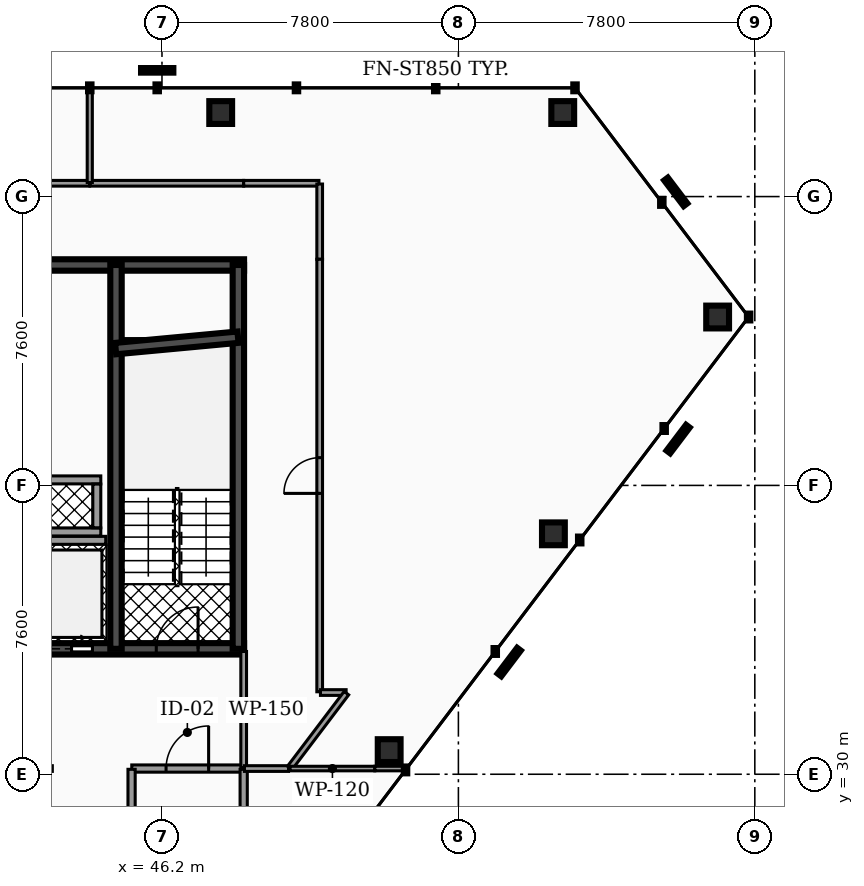
"""IFC4 building model, lengths in metres.
Left out: names, types, materials, properties, quantities, classifications, styles, units other than length and angle.
Written with IfcOpenShell. Run it as: python <this file> out.ifc"""

import sys

from ifc_helpers import new_model, si_unit, direction, frame, frame_2d, origin, origin_2d, place, context, subcontext, project, spatial, rectangle, hollow_rectangle, extrude, element, fill, save


model = new_model("IFC4")
c1 = context("Model", 3, precision=1e-05, world=origin(), true_north=direction((0.0, 1.0)))
c2 = subcontext(c1, "Body", "Model", "MODEL_VIEW")
j1 = project(units=[si_unit("LENGTHUNIT", "METRE"), si_unit("PLANEANGLEUNIT", "RADIAN")], contexts=[c1])
p1 = place(None, origin())
s1 = spatial("IfcSite", under=j1, at=p1, CompositionType="ELEMENT")
p2 = place(p1, origin())
s2 = spatial("IfcBuilding", under=s1, at=p2, CompositionType="ELEMENT")
p3 = place(p2, frame((0.0, 0.0, 246.16)))
s3 = spatial("IfcBuildingStorey", under=s2, at=p3, CompositionType="ELEMENT", Elevation=246.16)
p4 = place(p3, frame((28.5, 43.4, 0.0), z_axis=(0.0, 0.0, 1.0), x_axis=(1.0, 0.0, 0.0)))
e1 = element("IfcWall", 1, at=p4, inside=s3, PredefinedType="SHEAR", context=c2, shape_type="SweptSolid", body=[
    extrude(rectangle(XDim=19.86, YDim=0.3, at=frame_2d((9.93, 0.0))), origin(), (0.0, 0.0, 1.0), 3.18),
])
p5 = place(p3, frame((28.5, 33.3, 0.0), z_axis=(0.0, 0.0, 1.0), x_axis=(1.0, 0.0, 0.0)))
e2 = element("IfcWall", 2, at=p5, inside=s3, PredefinedType="SHEAR", context=c2, shape_type="SweptSolid", body=[
    extrude(rectangle(XDim=19.86, YDim=0.3, at=frame_2d((9.93, 0.0))), origin(), (0.0, 0.0, 1.0), 3.18),
])
p6 = place(p5, frame((3.93, 0.0, 0.0)))
e3 = element("IfcOpeningElement", 3, at=p6, cuts=e2, PredefinedType="OPENING", context=c2, shape_type="SweptSolid", body=[
    extrude(rectangle(XDim=1.1, YDim=2.15, at=frame_2d((0.55, 1.075))), frame((0.0, 0.16, 0.0), z_axis=(0.0, -1.0, 0.0), x_axis=(1.0, 0.0, 0.0)), (0.0, 0.0, 1.0), 0.32),
])
p7 = place(p5, frame((14.77, 0.0, 0.0)))
e4 = element("IfcOpeningElement", 4, at=p7, cuts=e2, PredefinedType="OPENING", context=c2, shape_type="SweptSolid", body=[
    extrude(rectangle(XDim=1.1, YDim=2.15, at=frame_2d((0.55, 1.075))), frame((0.0, 0.16, 0.0), z_axis=(0.0, -1.0, 0.0), x_axis=(1.0, 0.0, 0.0)), (0.0, 0.0, 1.0), 0.32),
])
p8 = place(p5, frame((11.25, 0.0, 0.0)))
e5 = element("IfcOpeningElement", 5, at=p8, cuts=e2, PredefinedType="OPENING", context=c2, shape_type="SweptSolid", body=[
    extrude(rectangle(XDim=1.0, YDim=2.1, at=frame_2d((0.5, 1.05))), frame((0.0, 0.16, 0.0), z_axis=(0.0, -1.0, 0.0), x_axis=(1.0, 0.0, 0.0)), (0.0, 0.0, 1.0), 0.32),
])
p9 = place(p5, frame((12.95, 0.0, 0.0)))
e6 = element("IfcOpeningElement", 6, at=p9, cuts=e2, PredefinedType="OPENING", context=c2, shape_type="SweptSolid", body=[
    extrude(rectangle(XDim=1.0, YDim=2.1, at=frame_2d((0.5, 1.05))), frame((0.0, 0.16, 0.0), z_axis=(0.0, -1.0, 0.0), x_axis=(1.0, 0.0, 0.0)), (0.0, 0.0, 1.0), 0.32),
])
p10 = place(p5, frame((5.85, 0.0, 0.0)))
e7 = element("IfcOpeningElement", 7, at=p10, cuts=e2, PredefinedType="OPENING", context=c2, shape_type="SweptSolid", body=[
    extrude(rectangle(XDim=1.0, YDim=2.1, at=frame_2d((0.5, 1.05))), frame((0.0, 0.16, 0.0), z_axis=(0.0, -1.0, 0.0), x_axis=(1.0, 0.0, 0.0)), (0.0, 0.0, 1.0), 0.32),
])
p11 = place(p5, frame((1.21, 0.0, 0.0)))
e8 = element("IfcOpeningElement", 8, at=p11, cuts=e2, PredefinedType="OPENING", context=c2, shape_type="SweptSolid", body=[
    extrude(rectangle(XDim=1.1, YDim=2.2, at=frame_2d((0.55, 1.1))), frame((0.0, 0.16, 0.0), z_axis=(0.0, -1.0, 0.0), x_axis=(1.0, 0.0, 0.0)), (0.0, 0.0, 1.0), 0.32),
])
p12 = place(p5, frame((9.34, 0.0, 0.0)))
e9 = element("IfcOpeningElement", 9, at=p12, cuts=e2, PredefinedType="OPENING", context=c2, shape_type="SweptSolid", body=[
    extrude(rectangle(XDim=1.12, YDim=2.05, at=frame_2d((0.56, 1.025))), frame((0.0, 0.16, 0.0), z_axis=(0.0, -1.0, 0.0), x_axis=(1.0, 0.0, 0.0)), (0.0, 0.0, 1.0), 0.32),
])
p13 = place(p5, frame((17.55, 0.0, 0.0)))
e10 = element("IfcOpeningElement", 10, at=p13, cuts=e2, PredefinedType="OPENING", context=c2, shape_type="SweptSolid", body=[
    extrude(rectangle(XDim=1.1, YDim=2.2, at=frame_2d((0.55, 1.1))), frame((0.0, 0.16, 0.0), z_axis=(0.0, -1.0, 0.0), x_axis=(1.0, 0.0, 0.0)), (0.0, 0.0, 1.0), 0.32),
])
for number, where, z_axis, x_axis in (
    (11, (44.99, 33.3, 0.0), (0.0, 0.0, 1.0), (0.0, 1.0, 0.0)),
    (12, (48.21, 33.3, 0.0), (0.0, 0.0, 1.0), (0.0, 1.0, 0.0)),
):
    element("IfcWall", number, at=place(p3, frame(where, z_axis=z_axis, x_axis=x_axis)), inside=s3, PredefinedType="SHEAR", context=c2, shape_type="SweptSolid", body=[
        extrude(rectangle(XDim=10.1, YDim=0.3, at=frame_2d((5.05, 0.0))), origin(), (0.0, 0.0, 1.0), 3.18),
    ])
p14 = place(p3, frame((44.98, 41.2, 0.0), z_axis=(0.0, 0.0, 1.0), x_axis=(0.995686468965, 0.09278176286, 0.0)))
e13 = element("IfcWall", 13, at=p14, inside=s3, PredefinedType="SHEAR", context=c2, shape_type="SweptSolid", body=[
    extrude(rectangle(XDim=3.234, YDim=0.3, at=frame_2d((1.617, 0.0))), origin(), (0.0, 0.0, 1.0), 3.18),
])
p15 = place(p3, frame((56.746, 47.411, 0.0), z_axis=(0.041162596694, -0.03664007676, 0.99848041814), x_axis=(0.664881694145, 0.746948681498, 0.0)))
e14 = element("IfcColumn", 14, at=p15, inside=s3, PredefinedType="COLUMN", context=c2, shape_type="SweptSolid", body=[
    extrude(hollow_rectangle(XDim=0.6, YDim=0.6, WallThickness=0.03, at=origin_2d()), origin(), (0.0, 0.0, 1.0), 3.185),
])
p16 = place(p3, frame((47.745, 47.411, 0.0), z_axis=(0.017795734664, -0.036665349869, 0.999169136807), x_axis=(0.899634918782, 0.436642889451, 0.0)))
e15 = element("IfcColumn", 15, at=p16, inside=s3, PredefinedType="COLUMN", context=c2, shape_type="SweptSolid", body=[
    extrude(hollow_rectangle(XDim=0.6, YDim=0.6, WallThickness=0.03, at=origin_2d()), origin(), (0.0, 0.0, 1.0), 3.183),
])
p17 = place(p3, frame((52.178, 30.622, 0.0), z_axis=(-0.084162242109, 0.092768878632, 0.992124312856), x_axis=(-0.740627546931, -0.671915795861, 0.0)))
e16 = element("IfcColumn", 16, at=p17, inside=s3, PredefinedType="COLUMN", context=c2, shape_type="SweptSolid", body=[
    extrude(hollow_rectangle(XDim=0.6, YDim=0.6, WallThickness=0.03, at=origin_2d()), origin(), (0.0, 0.0, 1.0), 3.205),
])
p18 = place(p3, frame((56.5, 36.326, 0.0), z_axis=(-0.077358900823, 0.101647768305, 0.991808112319), x_axis=(-0.795760000333, -0.605612105122, 0.0)))
e17 = element("IfcColumn", 17, at=p18, inside=s3, PredefinedType="COLUMN", context=c2, shape_type="SweptSolid", body=[
    extrude(hollow_rectangle(XDim=0.6, YDim=0.6, WallThickness=0.03, at=origin_2d()), origin(), (0.0, 0.0, 1.0), 3.207),
])
p19 = place(p3, frame((60.822, 42.031, 0.0), z_axis=(-0.070474747742, 0.110582946512, 0.991365080014), x_axis=(-0.843302825125, -0.537438689653, 0.0)))
e18 = element("IfcColumn", 18, at=p19, inside=s3, PredefinedType="COLUMN", context=c2, shape_type="SweptSolid", body=[
    extrude(hollow_rectangle(XDim=0.6, YDim=0.6, WallThickness=0.03, at=origin_2d()), origin(), (0.0, 0.0, 1.0), 3.208),
])
p20 = place(p3, frame((42.92, 36.155, 0.0), z_axis=(0.0, 0.0, 1.0), x_axis=(1.0, 0.0, 0.0)))
e19 = element("IfcWall", 19, at=p20, inside=s3, PredefinedType="SOLIDWALL", context=c2, shape_type="SweptSolid", body=[
    extrude(rectangle(XDim=1.8, YDim=0.21, at=frame_2d((0.9, 0.0))), origin(), (0.0, 0.0, 1.0), 3.18),
])
for number, where, z_axis, x_axis in (
    (20, (42.99, 36.375, 0.0), (0.0, 0.0, 1.0), (1.0, 0.0, 0.0)),
    (21, (42.99, 37.745, 0.0), (0.0, 0.0, 1.0), (1.0, 0.0, 0.0)),
):
    element("IfcWall", number, at=place(p3, frame(where, z_axis=z_axis, x_axis=x_axis)), inside=s3, PredefinedType="SOLIDWALL", context=c2, shape_type="SweptSolid", body=[
        extrude(rectangle(XDim=1.6, YDim=0.21, at=frame_2d((0.8, 0.0))), origin(), (0.0, 0.0, 1.0), 3.18),
    ])
p21 = place(p3, frame((44.485, 36.485, 0.0), z_axis=(0.0, 0.0, 1.0), x_axis=(0.0, 1.0, 0.0)))
e22 = element("IfcWall", 22, at=p21, inside=s3, PredefinedType="SOLIDWALL", context=c2, shape_type="SweptSolid", body=[
    extrude(rectangle(XDim=1.15, YDim=0.21, at=frame_2d((0.575, 0.0))), origin(), (0.0, 0.0, 1.0), 3.18),
])
p22 = place(p3, frame((45.405, 30.15, 0.0), z_axis=(0.0, 0.0, 1.0), x_axis=(1.0, 0.0, 0.0)))
e23 = element("IfcWall", 23, at=p22, inside=s3, PredefinedType="PARTITIONING", context=c2, shape_type="SweptSolid", body=[
    extrude(rectangle(XDim=2.925, YDim=0.19, at=frame_2d((1.462, 0.0))), origin(), (0.0, 0.0, 1.0), 2.235),
])
p23 = place(p22, frame((0.903, 0.0, 0.0)))
e24 = element("IfcOpeningElement", 24, at=p23, cuts=e23, PredefinedType="OPENING", context=c2, shape_type="SweptSolid", body=[
    extrude(rectangle(XDim=1.12, YDim=2.05, at=frame_2d((0.56, 1.025))), frame((0.0, 0.105, 0.0), z_axis=(0.0, -1.0, 0.0), x_axis=(1.0, 0.0, 0.0)), (0.0, 0.0, 1.0), 0.21),
])
p24 = place(p3, frame((48.35, 30.17, 0.0), z_axis=(0.0, 0.0, 1.0), x_axis=(0.0, 1.0, 0.0)))
e25 = element("IfcWall", 25, at=p24, inside=s3, PredefinedType="PARTITIONING", context=c2, shape_type="SweptSolid", body=[
    extrude(rectangle(XDim=3.06, YDim=0.15, at=frame_2d((1.53, 0.0))), origin(), (0.0, 0.0, 1.0), 2.235),
])
p25 = place(p3, frame((33.485, 30.15, 0.0), z_axis=(0.0, 0.0, 1.0), x_axis=(1.0, 0.0, 0.0)))
e26 = element("IfcWall", 26, at=p25, inside=s3, PredefinedType="PARTITIONING", context=c2, shape_type="SweptSolid", body=[
    extrude(rectangle(XDim=9.83, YDim=0.15, at=frame_2d((4.915, 0.0))), origin(), (0.0, 0.0, 1.0), 2.235),
])
p26 = place(p25, frame((0.445, 0.0, 0.0)))
e27 = element("IfcOpeningElement", 27, at=p26, cuts=e26, PredefinedType="OPENING", context=c2, shape_type="SweptSolid", body=[
    extrude(rectangle(XDim=0.94, YDim=2.05, at=frame_2d((0.47, 1.025))), frame((0.0, 0.085, 0.0), z_axis=(0.0, -1.0, 0.0), x_axis=(1.0, 0.0, 0.0)), (0.0, 0.0, 1.0), 0.17),
])
for number, where, z_axis, x_axis in (
    (28, (45.4, 27.37, 0.0), (0.0, 0.0, 1.0), (0.0, 1.0, 0.0)),
    (29, (48.35, 27.37, 0.0), (0.0, 0.0, 1.0), (0.0, 1.0, 0.0)),
):
    element("IfcWall", number, at=place(p3, frame(where, z_axis=z_axis, x_axis=x_axis)), inside=s3, PredefinedType="PARTITIONING", context=c2, shape_type="SweptSolid", body=[
        extrude(rectangle(XDim=2.76, YDim=0.19, at=frame_2d((1.38, 0.0))), origin(), (0.0, 0.0, 1.0), 2.235),
    ])
p27 = place(p3, frame((48.37, 30.15, 0.0), z_axis=(0.0, 0.0, 1.0), x_axis=(1.0, 0.0, 0.0)))
e30 = element("IfcWall", 30, at=p27, inside=s3, PredefinedType="PARTITIONING", context=c2, shape_type="SweptSolid", body=[
    extrude(rectangle(XDim=1.16, YDim=0.15, at=frame_2d((0.58, 0.0))), origin(), (0.0, 0.0, 1.0), 2.235),
])
p28 = place(p3, frame((44.305, 45.55, 0.0), z_axis=(0.0, 0.0, 1.0), x_axis=(1.0, 0.0, 0.0)))
e31 = element("IfcWall", 31, at=p28, inside=s3, PredefinedType="PARTITIONING", context=c2, shape_type="SweptSolid", body=[
    extrude(rectangle(XDim=4.045, YDim=0.15, at=frame_2d((2.022, 0.0))), origin(), (0.0, 0.0, 1.0), 2.235),
])
for number, where, z_axis, x_axis in (
    (32, (48.35, 45.55, 0.0), (0.0, 0.0, 1.0), (1.0, 0.0, 0.0)),
    (33, (50.35, 43.55, 0.0), (0.0, 0.0, 1.0), (0.0, 1.0, 0.0)),
):
    element("IfcWall", number, at=place(p3, frame(where, z_axis=z_axis, x_axis=x_axis)), inside=s3, PredefinedType="PARTITIONING", context=c2, shape_type="SweptSolid", body=[
        extrude(rectangle(XDim=1.98, YDim=0.15, at=frame_2d((0.99, 0.0))), origin(), (0.0, 0.0, 1.0), 2.235),
    ])
p29 = place(p3, frame((50.35, 32.17, 0.0), z_axis=(0.0, 0.0, 1.0), x_axis=(0.0, 1.0, 0.0)))
e34 = element("IfcWall", 34, at=p29, inside=s3, PredefinedType="PARTITIONING", context=c2, shape_type="SweptSolid", body=[
    extrude(rectangle(XDim=11.38, YDim=0.15, at=frame_2d((5.69, 0.0))), origin(), (0.0, 0.0, 1.0), 2.235),
])
p30 = place(p29, frame((5.22, 0.0, 0.0)))
e35 = element("IfcOpeningElement", 35, at=p30, cuts=e34, PredefinedType="OPENING", context=c2, shape_type="SweptSolid", body=[
    extrude(rectangle(XDim=0.94, YDim=2.05, at=frame_2d((0.47, 1.025))), frame((0.0, 0.085, 0.0), z_axis=(0.0, -1.0, 0.0), x_axis=(1.0, 0.0, 0.0)), (0.0, 0.0, 1.0), 0.17),
])
p31 = place(p3, frame((50.37, 32.15, 0.0), z_axis=(0.0, 0.0, 1.0), x_axis=(1.0, 0.0, 0.0)))
e36 = element("IfcWall", 36, at=p31, inside=s3, PredefinedType="PARTITIONING", context=c2, shape_type="SweptSolid", body=[
    extrude(rectangle(XDim=0.675, YDim=0.15, at=frame_2d((0.338, 0.0))), origin(), (0.0, 0.0, 1.0), 2.235),
])
p32 = place(p3, frame((49.562, 30.166, 0.0), z_axis=(0.0, 0.0, 1.0), x_axis=(0.603806281462, 0.797131089889, 0.0)))
e37 = element("IfcWall", 37, at=p32, inside=s3, PredefinedType="PARTITIONING", context=c2, shape_type="SweptSolid", body=[
    extrude(rectangle(XDim=2.469, YDim=0.15, at=frame_2d((1.234, 0.0))), origin(), (0.0, 0.0, 1.0), 2.235),
])
p33 = place(p3, frame((40.435, 45.55, 0.0), z_axis=(0.0, 0.0, 1.0), x_axis=(1.0, 0.0, 0.0)))
e38 = element("IfcWall", 38, at=p33, inside=s3, PredefinedType="PARTITIONING", context=c2, shape_type="SweptSolid", body=[
    extrude(rectangle(XDim=3.86, YDim=0.15, at=frame_2d((1.93, 0.0))), origin(), (0.0, 0.0, 1.0), 2.235),
])
p34 = place(p3, frame((49.57, 30.15, 0.0), z_axis=(0.0, 0.0, 1.0), x_axis=(1.0, 0.0, 0.0)))
e39 = element("IfcWall", 39, at=p34, inside=s3, PredefinedType="PARTITIONING", context=c2, shape_type="SweptSolid", body=[
    extrude(rectangle(XDim=2.23, YDim=0.12, at=frame_2d((1.115, 0.0))), origin(), (0.0, 0.0, 1.0), 2.235),
])
p35 = place(p3, frame((51.8, 30.15, 0.0), z_axis=(0.0, 0.0, 1.0), x_axis=(1.0, 0.0, 0.0)))
e40 = element("IfcWall", 40, at=p35, inside=s3, PredefinedType="PARTITIONING", context=c2, shape_type="SweptSolid", body=[
    extrude(rectangle(XDim=0.822, YDim=0.12, at=frame_2d((0.411, 0.0))), origin(), (0.0, 0.0, 1.0), 2.235),
])
p36 = place(p3, frame((44.3, 45.57, 0.0), z_axis=(0.0, 0.0, 1.0), x_axis=(0.0, 1.0, 0.0)))
e41 = element("IfcWall", 41, at=p36, inside=s3, PredefinedType="PARTITIONING", context=c2, shape_type="SweptSolid", body=[
    extrude(rectangle(XDim=2.476, YDim=0.135, at=frame_2d((1.238, 0.0))), origin(), (0.0, 0.0, 1.0), 2.235),
])
p37 = place(p7, origin())
e42 = element("IfcDoor", 42, at=p37, inside=s3, OperationType="SLIDING_TO_RIGHT", PredefinedType="DOOR", context=c2, shape_type="SweptSolid", body=[
    extrude(rectangle(XDim=1.1, YDim=2.15, at=frame_2d((0.55, 1.075))), frame((0.0, 0.025, 0.0), z_axis=(0.0, -1.0, 0.0), x_axis=(1.0, 0.0, 0.0)), (0.0, 0.0, 1.0), 0.05),
])
fill(e4, e42)
p38 = place(p13, origin())
e43 = element("IfcDoor", 43, at=p38, inside=s3, OperationType="SINGLE_SWING_RIGHT", PredefinedType="DOOR", context=c2, shape_type="SweptSolid", body=[
    extrude(rectangle(XDim=1.1, YDim=2.2, at=frame_2d((0.55, 1.1))), frame((0.0, 0.025, 0.0), z_axis=(0.0, -1.0, 0.0), x_axis=(1.0, 0.0, 0.0)), (0.0, 0.0, 1.0), 0.05),
])
fill(e10, e43)
p39 = place(p23, origin())
e44 = element("IfcDoor", 44, at=p39, inside=s3, OperationType="SINGLE_SWING_RIGHT", PredefinedType="DOOR", context=c2, shape_type="SweptSolid", body=[
    extrude(rectangle(XDim=1.12, YDim=2.05, at=frame_2d((0.56, 1.025))), frame((0.0, 0.025, 0.0), z_axis=(0.0, -1.0, 0.0), x_axis=(1.0, 0.0, 0.0)), (0.0, 0.0, 1.0), 0.05),
])
fill(e24, e44)
p40 = place(p30, origin())
e45 = element("IfcDoor", 45, at=p40, inside=s3, OperationType="SINGLE_SWING_LEFT", PredefinedType="DOOR", context=c2, shape_type="SweptSolid", body=[
    extrude(rectangle(XDim=0.94, YDim=2.05, at=frame_2d((0.47, 1.025))), frame((0.0, 0.025, 0.0), z_axis=(0.0, -1.0, 0.0), x_axis=(1.0, 0.0, 0.0)), (0.0, 0.0, 1.0), 0.05),
])
fill(e35, e45)
save(model, sys.argv[1])
